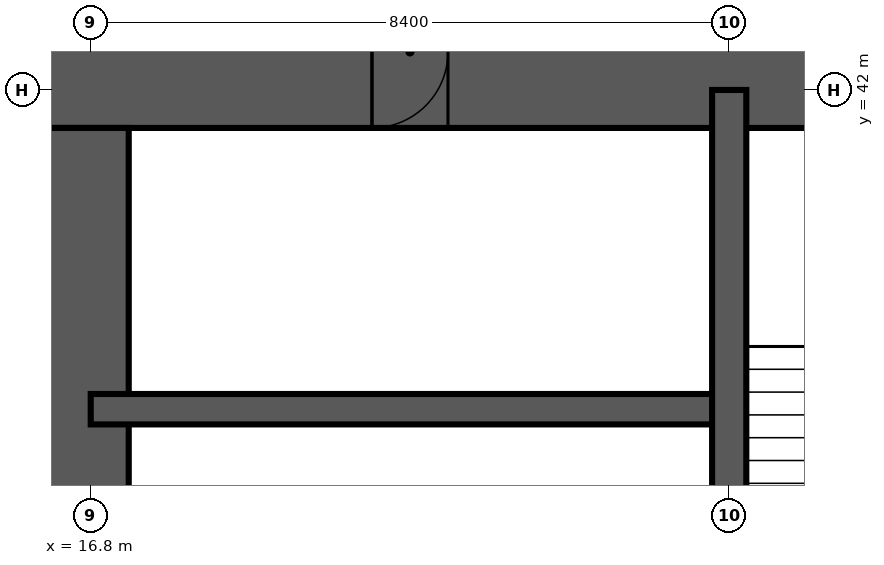
"""IFC4 building model, lengths in metres.
Left out: names, types, materials, properties, quantities, classifications, styles, units other than length and angle.
Written with IfcOpenShell. Run it as: python <this file> out.ifc"""

import sys

from ifc_helpers import new_model, si_unit, direction, frame, frame_2d, origin, place, context, subcontext, project, spatial, rectangle, extrude, element, fill, save


model = new_model("IFC4")
c1 = context("Model", 3, precision=1e-05, world=origin(), true_north=direction((0.0, 1.0)))
c2 = subcontext(c1, "Body", "Model", "MODEL_VIEW")
j1 = project(units=[si_unit("LENGTHUNIT", "METRE"), si_unit("PLANEANGLEUNIT", "RADIAN")], contexts=[c1])
p1 = place(None, origin())
s1 = spatial("IfcSite", under=j1, at=p1, CompositionType="ELEMENT")
p2 = place(p1, origin())
s2 = spatial("IfcBuilding", under=s1, at=p2, CompositionType="ELEMENT")
p3 = place(p2, frame((0.0, 0.0, 27.0)))
s3 = spatial("IfcBuildingStorey", under=s2, at=p3, CompositionType="ELEMENT", Elevation=27.0)
p4 = place(p3, frame((43.5, 42.5, -0.35), z_axis=(0.0, 0.0, 1.0), x_axis=(-1.0, 0.0, 0.0)))
e1 = element("IfcWall", 1, at=p4, inside=s3, PredefinedType="SHEAR", context=c2, shape_type="SweptSolid", body=[
    extrude(rectangle(XDim=28.2, YDim=2.0, at=frame_2d((14.1, 0.0))), origin(), (0.0, 0.0, 1.0), 3.6),
])
p5 = place(p4, frame((22.0, 0.0, 0.35)))
e2 = element("IfcOpeningElement", 2, at=p5, cuts=e1, PredefinedType="OPENING", context=c2, shape_type="SweptSolid", body=[
    extrude(rectangle(XDim=1.0, YDim=2.1, at=frame_2d((0.5, 1.05))), frame((0.0, 1.01, 0.0), z_axis=(0.0, -1.0, 0.0), x_axis=(1.0, 0.0, 0.0)), (0.0, 0.0, 1.0), 2.02),
])
p6 = place(p4, frame((11.4, 0.0, 0.35)))
e3 = element("IfcOpeningElement", 3, at=p6, cuts=e1, PredefinedType="OPENING", context=c2, shape_type="SweptSolid", body=[
    extrude(rectangle(XDim=1.2, YDim=2.2, at=frame_2d((0.6, 1.1))), frame((0.0, 1.01, 0.0), z_axis=(0.0, -1.0, 0.0), x_axis=(1.0, 0.0, 0.0)), (0.0, 0.0, 1.0), 2.02),
])
p7 = place(p3, frame((16.3, 41.5, -0.35), z_axis=(0.0, 0.0, 1.0), x_axis=(0.0, -1.0, 0.0)))
e4 = element("IfcWall", 4, at=p7, inside=s3, PredefinedType="SHEAR", context=c2, shape_type="SweptSolid", body=[
    extrude(rectangle(XDim=24.2, YDim=2.0, at=frame_2d((12.1, 0.0))), origin(), (0.0, 0.0, 1.0), 3.6),
])
p8 = place(p7, frame((11.2, 0.0, 0.35)))
e5 = element("IfcOpeningElement", 5, at=p8, cuts=e4, PredefinedType="OPENING", context=c2, shape_type="SweptSolid", body=[
    extrude(rectangle(XDim=1.8, YDim=2.2, at=frame_2d((0.9, 1.1))), frame((0.0, 1.01, 0.0), z_axis=(0.0, -1.0, 0.0), x_axis=(1.0, 0.0, 0.0)), (0.0, 0.0, 1.0), 2.02),
])
p9 = place(p7, frame((20.0, 0.0, 0.35)))
e6 = element("IfcOpeningElement", 6, at=p9, cuts=e4, PredefinedType="OPENING", context=c2, shape_type="SweptSolid", body=[
    extrude(rectangle(XDim=1.0, YDim=2.1, at=frame_2d((0.5, 1.05))), frame((0.0, 1.01, 0.0), z_axis=(0.0, -1.0, 0.0), x_axis=(1.0, 0.0, 0.0)), (0.0, 0.0, 1.0), 2.02),
])
p10 = place(p7, frame((5.3, 0.0, 0.35)))
e7 = element("IfcOpeningElement", 7, at=p10, cuts=e4, PredefinedType="OPENING", context=c2, shape_type="SweptSolid", body=[
    extrude(rectangle(XDim=1.0, YDim=2.1, at=frame_2d((0.5, 1.05))), frame((0.0, 1.01, 0.0), z_axis=(0.0, -1.0, 0.0), x_axis=(1.0, 0.0, 0.0)), (0.0, 0.0, 1.0), 2.02),
])
p11 = place(p3, frame((16.8, 37.8, -0.35), z_axis=(0.0, 0.0, 1.0), x_axis=(1.0, 0.0, 0.0)))
e8 = element("IfcWall", 8, at=p11, inside=s3, PredefinedType="SHEAR", context=c2, shape_type="SweptSolid", body=[
    extrude(rectangle(XDim=8.4, YDim=0.4, at=frame_2d((4.2, 0.0))), origin(), (0.0, 0.0, 1.0), 3.6),
])
p12 = place(p3, frame((25.2, 16.8, -0.35), z_axis=(0.0, 0.0, 1.0), x_axis=(0.0, 1.0, 0.0)))
e9 = element("IfcWall", 9, at=p12, inside=s3, PredefinedType="SHEAR", context=c2, shape_type="SweptSolid", body=[
    extrude(rectangle(XDim=25.2, YDim=0.45, at=frame_2d((12.6, 0.0))), origin(), (0.0, 0.0, 1.0), 3.6),
])
p13 = place(p5, origin())
e10 = element("IfcDoor", 10, at=p13, inside=s3, OperationType="SINGLE_SWING_RIGHT", PredefinedType="DOOR", context=c2, shape_type="SweptSolid", body=[
    extrude(rectangle(XDim=1.0, YDim=2.1, at=frame_2d((0.5, 1.05))), frame((0.0, 0.025, 0.0), z_axis=(0.0, -1.0, 0.0), x_axis=(1.0, 0.0, 0.0)), (0.0, 0.0, 1.0), 0.05),
])
fill(e2, e10)
save(model, sys.argv[1])
